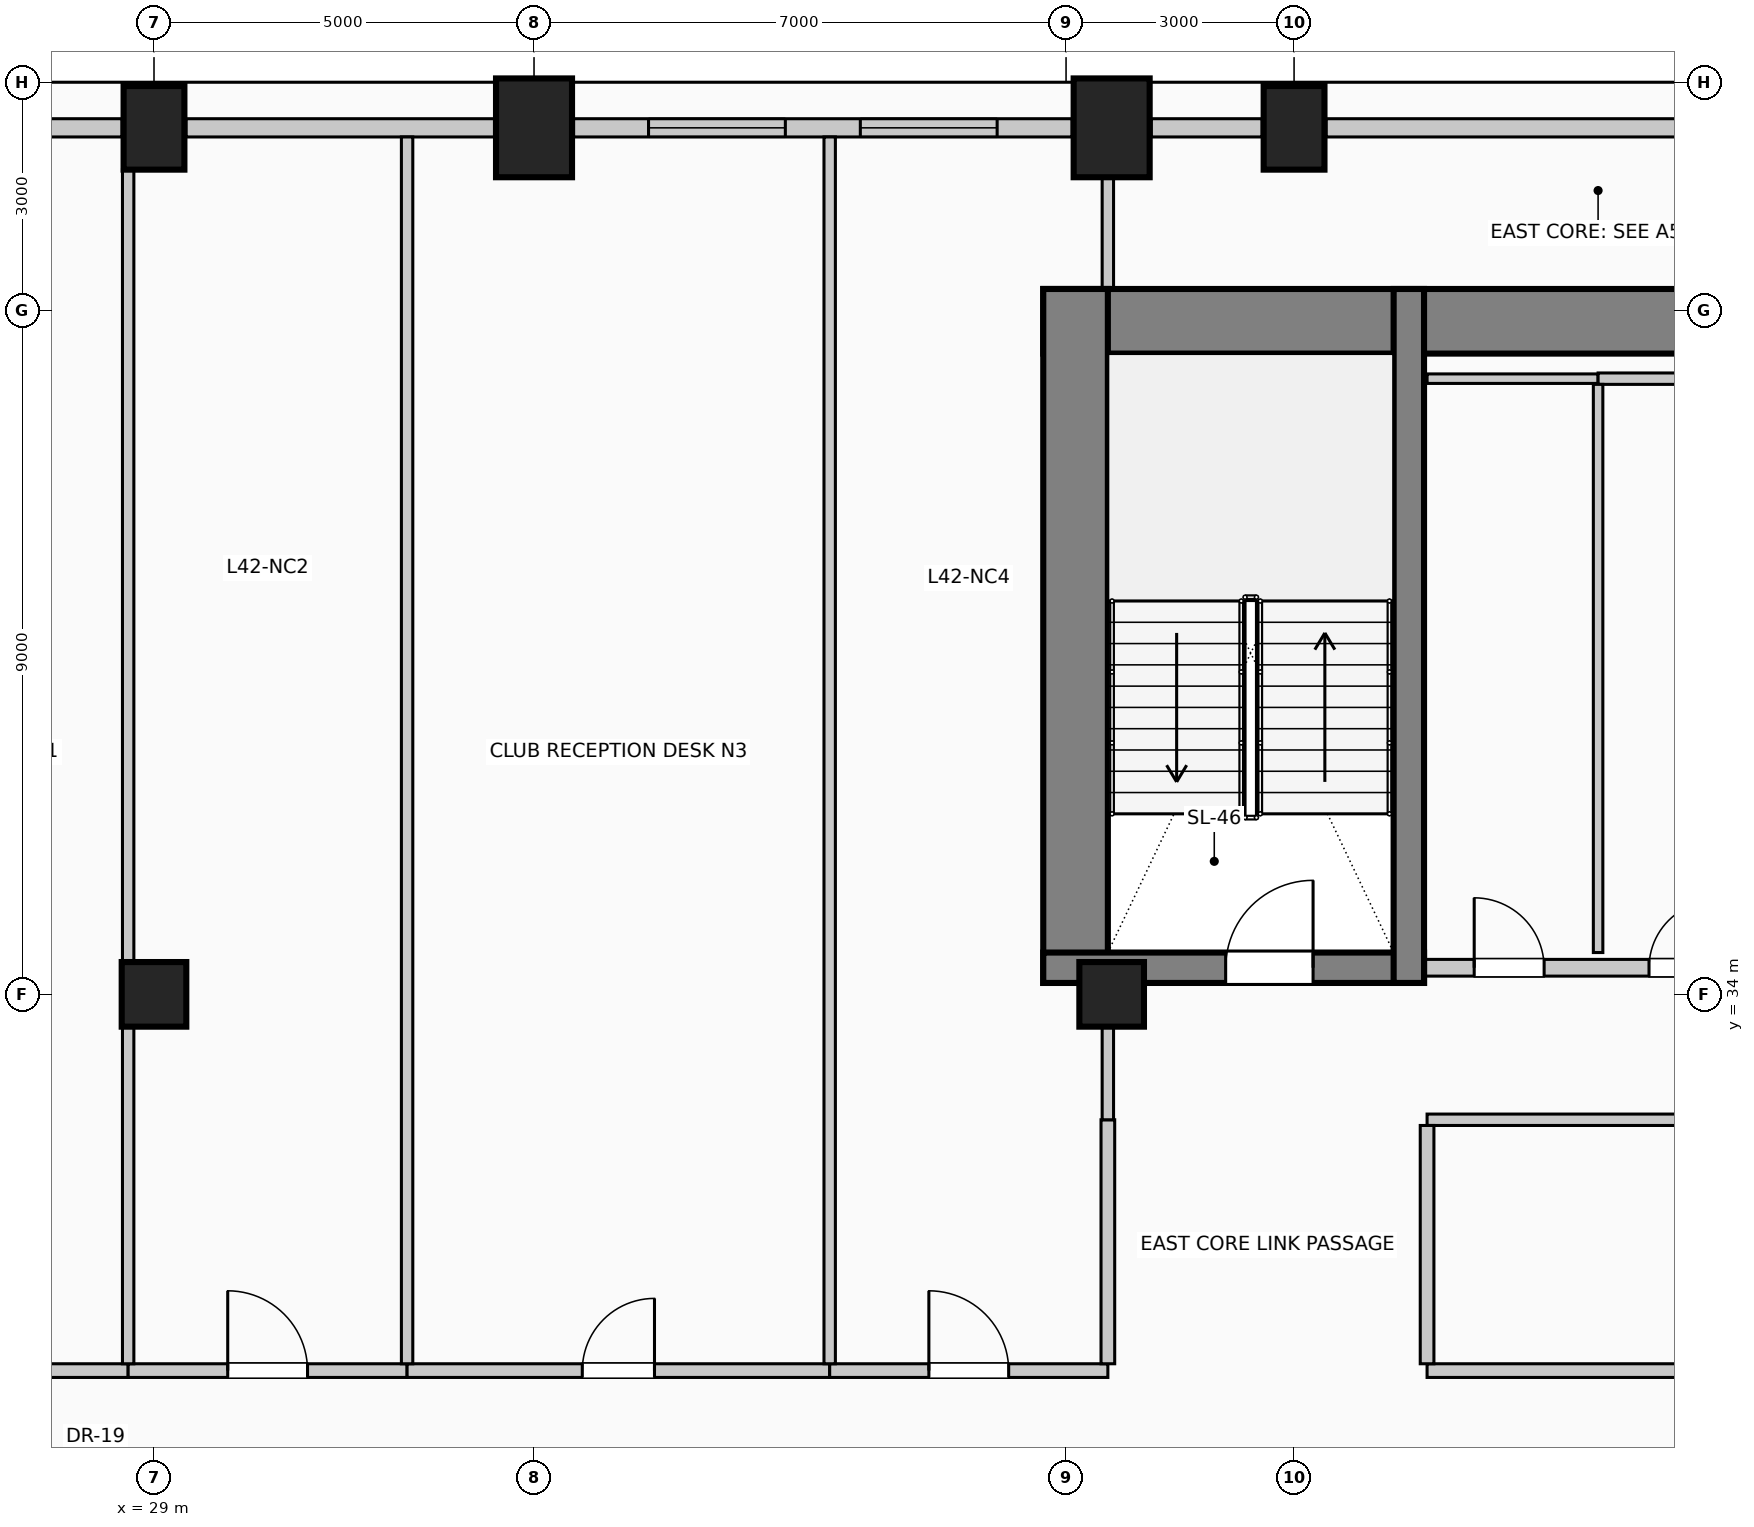
"""IFC4 building model, lengths in metres.
Left out: names, types, materials, properties, quantities, classifications, styles, units other than length and angle.
Written with IfcOpenShell. Run it as: python <this file> out.ifc"""

import sys

from ifc_helpers import new_model, si_unit, direction, frame, frame_2d, origin, origin_2d, place, context, subcontext, project, spatial, rectangle, circle, extrude, element, fill, save


model = new_model("IFC4")
c1 = context("Model", 3, precision=1e-05, world=origin(), true_north=direction((0.0, 1.0)))
c2 = subcontext(c1, "Body", "Model", "MODEL_VIEW")
j1 = project(units=[si_unit("LENGTHUNIT", "METRE"), si_unit("PLANEANGLEUNIT", "RADIAN")], contexts=[c1])
p1 = place(None, origin())
s1 = spatial("IfcSite", under=j1, at=p1, CompositionType="ELEMENT")
p2 = place(p1, origin())
s2 = spatial("IfcBuilding", under=s1, at=p2, CompositionType="ELEMENT")
p3 = place(p2, frame((0.0, 0.0, 174.6)))
s3 = spatial("IfcBuildingStorey", under=s2, at=p3, CompositionType="ELEMENT", Elevation=174.6)
p4 = place(p3, frame((40.7, 42.855, 0.0), z_axis=(0.0, 0.0, 1.0), x_axis=(1.0, 0.0, 0.0)))
e1 = element("IfcWall", 1, at=p4, inside=s3, PredefinedType="SHEAR", context=c2, shape_type="SweptSolid", body=[
    extrude(rectangle(XDim=14.6, YDim=0.85, at=frame_2d((7.3, 0.0))), origin(), (0.0, 0.0, 1.0), 4.0),
])
p5 = place(p3, frame((41.125, 34.15, 0.0), z_axis=(0.0, 0.0, 1.0), x_axis=(0.0, 1.0, 0.0)))
e2 = element("IfcWall", 2, at=p5, inside=s3, PredefinedType="SHEAR", context=c2, shape_type="SweptSolid", body=[
    extrude(rectangle(XDim=9.13, YDim=0.85, at=frame_2d((4.565, 0.0))), origin(), (0.0, 0.0, 1.0), 4.0),
])
p6 = place(p3, frame((40.7, 34.35, 0.0), z_axis=(0.0, 0.0, 1.0), x_axis=(1.0, 0.0, 0.0)))
e3 = element("IfcWall", 3, at=p6, inside=s3, PredefinedType="SHEAR", context=c2, shape_type="SweptSolid", body=[
    extrude(rectangle(XDim=5.01, YDim=0.4, at=frame_2d((2.505, 0.0))), origin(), (0.0, 0.0, 1.0), 4.0),
])
p7 = place(p6, frame((2.4, 0.0, 0.0)))
e4 = element("IfcOpeningElement", 4, at=p7, cuts=e3, PredefinedType="OPENING", context=c2, shape_type="SweptSolid", body=[
    extrude(rectangle(XDim=1.15, YDim=2.2, at=frame_2d((0.575, 1.1))), frame((0.0, 0.21, 0.0), z_axis=(0.0, -1.0, 0.0), x_axis=(1.0, 0.0, 0.0)), (0.0, 0.0, 1.0), 0.42),
])
p8 = place(p3, frame((45.51, 34.15, 0.0), z_axis=(0.0, 0.0, 1.0), x_axis=(0.0, 1.0, 0.0)))
e5 = element("IfcWall", 5, at=p8, inside=s3, PredefinedType="SHEAR", context=c2, shape_type="SweptSolid", body=[
    extrude(rectangle(XDim=9.13, YDim=0.4, at=frame_2d((4.565, 0.0))), origin(), (0.0, 0.0, 1.0), 4.0),
])
p9 = place(p3, frame((29.0, 45.4, 0.0), z_axis=(0.0, 0.0, 1.0), x_axis=(1.0, 0.0, 0.0)))
e6 = element("IfcColumn", 6, at=p9, inside=s3, PredefinedType="COLUMN", context=c2, shape_type="SweptSolid", body=[
    extrude(rectangle(XDim=0.8, YDim=1.1, at=origin_2d()), origin(), (0.0, 0.0, 1.0), 4.0),
])
for number, where, z_axis, x_axis in (
    (7, (34.0, 45.4, 0.0), (0.0, 0.0, 1.0), (1.0, 0.0, 0.0)),
    (8, (41.6, 45.4, 0.0), (0.0, 0.0, 1.0), (1.0, 0.0, 0.0)),
):
    element("IfcColumn", number, at=place(p3, frame(where, z_axis=z_axis, x_axis=x_axis)), inside=s3, PredefinedType="COLUMN", context=c2, shape_type="SweptSolid", body=[
        extrude(rectangle(XDim=1.0, YDim=1.3, at=origin_2d()), origin(), (0.0, 0.0, 1.0), 4.0),
    ])
p10 = place(p3, frame((44.0, 45.4, 0.0), z_axis=(0.0, 0.0, 1.0), x_axis=(1.0, 0.0, 0.0)))
e9 = element("IfcColumn", 9, at=p10, inside=s3, PredefinedType="COLUMN", context=c2, shape_type="SweptSolid", body=[
    extrude(rectangle(XDim=0.8, YDim=1.1, at=origin_2d()), origin(), (0.0, 0.0, 1.0), 4.0),
])
for number, where, z_axis, x_axis in (
    (10, (29.0, 34.0, 0.0), (0.0, 0.0, 1.0), (1.0, 0.0, 0.0)),
    (11, (41.6, 34.0, 0.0), (0.0, 0.0, 1.0), (1.0, 0.0, 0.0)),
):
    element("IfcColumn", number, at=place(p3, frame(where, z_axis=z_axis, x_axis=x_axis)), inside=s3, PredefinedType="COLUMN", context=c2, shape_type="SweptSolid", body=[
        extrude(circle(Radius=0.425, at=origin_2d()), origin(), (0.0, 0.0, 1.0), 4.0),
    ])
p11 = place(p3, frame((24.52, 45.4, 0.0), z_axis=(0.0, 0.0, 1.0), x_axis=(1.0, 0.0, 0.0)))
e12 = element("IfcWall", 12, at=p11, inside=s3, PredefinedType="SOLIDWALL", context=c2, shape_type="SweptSolid", body=[
    extrude(rectangle(XDim=4.06, YDim=0.24, at=frame_2d((2.03, 0.0))), origin(), (0.0, 0.0, 1.0), 2.975),
])
p12 = place(p11, frame((1.13, 0.0, 0.42)))
e13 = element("IfcOpeningElement", 13, at=p12, cuts=e12, PredefinedType="OPENING", context=c2, shape_type="SweptSolid", body=[
    extrude(rectangle(XDim=1.8, YDim=2.2, at=frame_2d((0.9, 1.1))), frame((0.0, 0.13, 0.0), z_axis=(0.0, -1.0, 0.0), x_axis=(1.0, 0.0, 0.0)), (0.0, 0.0, 1.0), 0.26),
])
p13 = place(p3, frame((29.42, 45.4, 0.0), z_axis=(0.0, 0.0, 1.0), x_axis=(1.0, 0.0, 0.0)))
e14 = element("IfcWall", 14, at=p13, inside=s3, PredefinedType="SOLIDWALL", context=c2, shape_type="SweptSolid", body=[
    extrude(rectangle(XDim=4.06, YDim=0.24, at=frame_2d((2.03, 0.0))), origin(), (0.0, 0.0, 1.0), 2.975),
])
p14 = place(p3, frame((34.52, 45.4, 0.0), z_axis=(0.0, 0.0, 1.0), x_axis=(1.0, 0.0, 0.0)))
e15 = element("IfcWall", 15, at=p14, inside=s3, PredefinedType="SOLIDWALL", context=c2, shape_type="SweptSolid", body=[
    extrude(rectangle(XDim=6.56, YDim=0.24, at=frame_2d((3.28, 0.0))), origin(), (0.0, 0.0, 1.0), 2.975),
])
p15 = place(p14, frame((0.987, 0.0, 0.42)))
e16 = element("IfcOpeningElement", 16, at=p15, cuts=e15, PredefinedType="OPENING", context=c2, shape_type="SweptSolid", body=[
    extrude(rectangle(XDim=1.8, YDim=2.2, at=frame_2d((0.9, 1.1))), frame((0.0, 0.13, 0.0), z_axis=(0.0, -1.0, 0.0), x_axis=(1.0, 0.0, 0.0)), (0.0, 0.0, 1.0), 0.26),
])
p16 = place(p14, frame((3.773, 0.0, 0.42)))
e17 = element("IfcOpeningElement", 17, at=p16, cuts=e15, PredefinedType="OPENING", context=c2, shape_type="SweptSolid", body=[
    extrude(rectangle(XDim=1.8, YDim=2.2, at=frame_2d((0.9, 1.1))), frame((0.0, 0.13, 0.0), z_axis=(0.0, -1.0, 0.0), x_axis=(1.0, 0.0, 0.0)), (0.0, 0.0, 1.0), 0.26),
])
p17 = place(p3, frame((42.12, 45.4, 0.0), z_axis=(0.0, 0.0, 1.0), x_axis=(1.0, 0.0, 0.0)))
e18 = element("IfcWall", 18, at=p17, inside=s3, PredefinedType="SOLIDWALL", context=c2, shape_type="SweptSolid", body=[
    extrude(rectangle(XDim=1.46, YDim=0.24, at=frame_2d((0.73, 0.0))), origin(), (0.0, 0.0, 1.0), 2.975),
])
p18 = place(p3, frame((44.42, 45.4, 0.0), z_axis=(0.0, 0.0, 1.0), x_axis=(1.0, 0.0, 0.0)))
e19 = element("IfcWall", 19, at=p18, inside=s3, PredefinedType="SOLIDWALL", context=c2, shape_type="SweptSolid", body=[
    extrude(rectangle(XDim=4.66, YDim=0.24, at=frame_2d((2.33, 0.0))), origin(), (0.0, 0.0, 1.0), 2.975),
])
p19 = place(p3, frame((45.72, 34.35, 0.0), z_axis=(0.0, 0.0, 1.0), x_axis=(1.0, 0.0, 0.0)))
e20 = element("IfcWall", 20, at=p19, inside=s3, PredefinedType="PARTITIONING", context=c2, shape_type="SweptSolid", body=[
    extrude(rectangle(XDim=4.56, YDim=0.22, at=frame_2d((2.28, 0.0))), origin(), (0.0, 0.0, 1.0), 3.725),
])
p20 = place(p19, frame((0.65, 0.0, 0.0)))
e21 = element("IfcOpeningElement", 21, at=p20, cuts=e20, PredefinedType="OPENING", context=c2, shape_type="SweptSolid", body=[
    extrude(rectangle(XDim=0.92, YDim=2.1, at=frame_2d((0.46, 1.05))), frame((0.0, 0.12, 0.0), z_axis=(0.0, -1.0, 0.0), x_axis=(1.0, 0.0, 0.0)), (0.0, 0.0, 1.0), 0.24),
])
p21 = place(p19, frame((2.95, 0.0, 0.0)))
e22 = element("IfcOpeningElement", 22, at=p21, cuts=e20, PredefinedType="OPENING", context=c2, shape_type="SweptSolid", body=[
    extrude(rectangle(XDim=0.88, YDim=2.1, at=frame_2d((0.44, 1.05))), frame((0.0, 0.12, 0.0), z_axis=(0.0, -1.0, 0.0), x_axis=(1.0, 0.0, 0.0)), (0.0, 0.0, 1.0), 0.24),
])
p22 = place(p3, frame((23.1, 29.05, 0.0), z_axis=(0.0, 0.0, 1.0), x_axis=(1.0, 0.0, 0.0)))
e23 = element("IfcWall", 23, at=p22, inside=s3, PredefinedType="PARTITIONING", context=c2, shape_type="SweptSolid", body=[
    extrude(rectangle(XDim=5.56, YDim=0.18, at=frame_2d((2.78, 0.0))), origin(), (0.0, 0.0, 1.0), 3.725),
])
p23 = place(p22, frame((2.305, 0.0, 0.0)))
e24 = element("IfcOpeningElement", 24, at=p23, cuts=e23, PredefinedType="OPENING", context=c2, shape_type="SweptSolid", body=[
    extrude(rectangle(XDim=0.95, YDim=2.15, at=frame_2d((0.475, 1.075))), frame((0.0, 0.1, 0.0), z_axis=(0.0, -1.0, 0.0), x_axis=(1.0, 0.0, 0.0)), (0.0, 0.0, 1.0), 0.2),
])
p24 = place(p3, frame((28.66, 29.05, 0.0), z_axis=(0.0, 0.0, 1.0), x_axis=(1.0, 0.0, 0.0)))
e25 = element("IfcWall", 25, at=p24, inside=s3, PredefinedType="PARTITIONING", context=c2, shape_type="SweptSolid", body=[
    extrude(rectangle(XDim=3.67, YDim=0.18, at=frame_2d((1.835, 0.0))), origin(), (0.0, 0.0, 1.0), 3.725),
])
p25 = place(p24, frame((1.31, 0.0, 0.0)))
e26 = element("IfcOpeningElement", 26, at=p25, cuts=e25, PredefinedType="OPENING", context=c2, shape_type="SweptSolid", body=[
    extrude(rectangle(XDim=1.05, YDim=2.15, at=frame_2d((0.525, 1.075))), frame((0.0, 0.1, 0.0), z_axis=(0.0, -1.0, 0.0), x_axis=(1.0, 0.0, 0.0)), (0.0, 0.0, 1.0), 0.2),
])
p26 = place(p3, frame((32.33, 29.05, 0.0), z_axis=(0.0, 0.0, 1.0), x_axis=(1.0, 0.0, 0.0)))
e27 = element("IfcWall", 27, at=p26, inside=s3, PredefinedType="PARTITIONING", context=c2, shape_type="SweptSolid", body=[
    extrude(rectangle(XDim=5.56, YDim=0.18, at=frame_2d((2.78, 0.0))), origin(), (0.0, 0.0, 1.0), 3.725),
])
p27 = place(p26, frame((2.305, 0.0, 0.0)))
e28 = element("IfcOpeningElement", 28, at=p27, cuts=e27, PredefinedType="OPENING", context=c2, shape_type="SweptSolid", body=[
    extrude(rectangle(XDim=0.95, YDim=2.15, at=frame_2d((0.475, 1.075))), frame((0.0, 0.1, 0.0), z_axis=(0.0, -1.0, 0.0), x_axis=(1.0, 0.0, 0.0)), (0.0, 0.0, 1.0), 0.2),
])
p28 = place(p3, frame((37.89, 29.05, 0.0), z_axis=(0.0, 0.0, 1.0), x_axis=(1.0, 0.0, 0.0)))
e29 = element("IfcWall", 29, at=p28, inside=s3, PredefinedType="PARTITIONING", context=c2, shape_type="SweptSolid", body=[
    extrude(rectangle(XDim=3.66, YDim=0.18, at=frame_2d((1.83, 0.0))), origin(), (0.0, 0.0, 1.0), 3.725),
])
p29 = place(p28, frame((1.305, 0.0, 0.0)))
e30 = element("IfcOpeningElement", 30, at=p29, cuts=e29, PredefinedType="OPENING", context=c2, shape_type="SweptSolid", body=[
    extrude(rectangle(XDim=1.05, YDim=2.15, at=frame_2d((0.525, 1.075))), frame((0.0, 0.1, 0.0), z_axis=(0.0, -1.0, 0.0), x_axis=(1.0, 0.0, 0.0)), (0.0, 0.0, 1.0), 0.2),
])
p30 = place(p3, frame((45.75, 29.05, 0.0), z_axis=(0.0, 0.0, 1.0), x_axis=(1.0, 0.0, 0.0)))
e31 = element("IfcWall", 31, at=p30, inside=s3, PredefinedType="PARTITIONING", context=c2, shape_type="SweptSolid", body=[
    extrude(rectangle(XDim=11.53, YDim=0.18, at=frame_2d((5.765, 0.0))), origin(), (0.0, 0.0, 1.0), 3.725),
])
p31 = place(p30, frame((5.29, 0.0, 0.0)))
e32 = element("IfcOpeningElement", 32, at=p31, cuts=e31, PredefinedType="OPENING", context=c2, shape_type="SweptSolid", body=[
    extrude(rectangle(XDim=0.95, YDim=2.15, at=frame_2d((0.475, 1.075))), frame((0.0, 0.1, 0.0), z_axis=(0.0, -1.0, 0.0), x_axis=(1.0, 0.0, 0.0)), (0.0, 0.0, 1.0), 0.2),
])
p32 = place(p3, frame((45.75, 32.35, 0.0), z_axis=(0.0, 0.0, 1.0), x_axis=(1.0, 0.0, 0.0)))
e33 = element("IfcWall", 33, at=p32, inside=s3, PredefinedType="PARTITIONING", context=c2, shape_type="SweptSolid", body=[
    extrude(rectangle(XDim=8.7, YDim=0.15, at=frame_2d((4.35, 0.0))), origin(), (0.0, 0.0, 1.0), 3.725),
])
p33 = place(p3, frame((45.75, 42.1, 0.0), z_axis=(0.0, 0.0, 1.0), x_axis=(1.0, 0.0, 0.0)))
e34 = element("IfcWall", 34, at=p33, inside=s3, PredefinedType="PARTITIONING", context=c2, shape_type="SweptSolid", body=[
    extrude(rectangle(XDim=2.25, YDim=0.125, at=frame_2d((1.125, 0.0))), origin(), (0.0, 0.0, 1.0), 3.725),
])
p34 = place(p3, frame((48.0, 42.1, 0.0), z_axis=(0.0, 0.0, 1.0), x_axis=(1.0, 0.0, 0.0)))
e35 = element("IfcWall", 35, at=p34, inside=s3, PredefinedType="PARTITIONING", context=c2, shape_type="SweptSolid", body=[
    extrude(rectangle(XDim=2.25, YDim=0.15, at=frame_2d((1.125, 0.0))), origin(), (0.0, 0.0, 1.0), 3.725),
])
p35 = place(p3, frame((28.66, 29.14, 0.0), z_axis=(0.0, 0.0, 1.0), x_axis=(0.0, 1.0, 0.0)))
e36 = element("IfcWall", 36, at=p35, inside=s3, PredefinedType="PARTITIONING", context=c2, shape_type="SweptSolid", body=[
    extrude(rectangle(XDim=4.435, YDim=0.15, at=frame_2d((2.218, 0.0))), origin(), (0.0, 0.0, 1.0), 3.725),
])
p36 = place(p3, frame((28.66, 34.425, 0.0), z_axis=(0.0, 0.0, 1.0), x_axis=(0.0, 1.0, 0.0)))
e37 = element("IfcWall", 37, at=p36, inside=s3, PredefinedType="PARTITIONING", context=c2, shape_type="SweptSolid", body=[
    extrude(rectangle(XDim=10.425, YDim=0.15, at=frame_2d((5.212, 0.0))), origin(), (0.0, 0.0, 1.0), 3.725),
])
for number, where, z_axis, x_axis in (
    (38, (32.33, 29.14, 0.0), (0.0, 0.0, 1.0), (0.0, 1.0, 0.0)),
    (39, (37.89, 29.14, 0.0), (0.0, 0.0, 1.0), (0.0, 1.0, 0.0)),
):
    element("IfcWall", number, at=place(p3, frame(where, z_axis=z_axis, x_axis=x_axis)), inside=s3, PredefinedType="PARTITIONING", context=c2, shape_type="SweptSolid", body=[
        extrude(rectangle(XDim=16.14, YDim=0.15, at=frame_2d((8.07, 0.0))), origin(), (0.0, 0.0, 1.0), 3.725),
    ])
p37 = place(p3, frame((41.55, 29.14, 0.0), z_axis=(0.0, 0.0, 1.0), x_axis=(0.0, 1.0, 0.0)))
e40 = element("IfcWall", 40, at=p37, inside=s3, PredefinedType="PARTITIONING", context=c2, shape_type="SweptSolid", body=[
    extrude(rectangle(XDim=3.21, YDim=0.18, at=frame_2d((1.605, 0.0))), origin(), (0.0, 0.0, 1.0), 3.12),
])
p38 = place(p3, frame((41.55, 32.35, 0.0), z_axis=(0.0, 0.0, 1.0), x_axis=(0.0, 1.0, 0.0)))
e41 = element("IfcWall", 41, at=p38, inside=s3, PredefinedType="PARTITIONING", context=c2, shape_type="SweptSolid", body=[
    extrude(rectangle(XDim=1.225, YDim=0.15, at=frame_2d((0.612, 0.0))), origin(), (0.0, 0.0, 1.0), 3.12),
])
p39 = place(p3, frame((41.55, 43.28, 0.0), z_axis=(0.0, 0.0, 1.0), x_axis=(0.0, 1.0, 0.0)))
e42 = element("IfcWall", 42, at=p39, inside=s3, PredefinedType="PARTITIONING", context=c2, shape_type="SweptSolid", body=[
    extrude(rectangle(XDim=1.47, YDim=0.15, at=frame_2d((0.735, 0.0))), origin(), (0.0, 0.0, 1.0), 3.725),
])
p40 = place(p3, frame((45.75, 29.14, 0.0), z_axis=(0.0, 0.0, 1.0), x_axis=(0.0, 1.0, 0.0)))
e43 = element("IfcWall", 43, at=p40, inside=s3, PredefinedType="PARTITIONING", context=c2, shape_type="SweptSolid", body=[
    extrude(rectangle(XDim=3.135, YDim=0.18, at=frame_2d((1.567, 0.0))), origin(), (0.0, 0.0, 1.0), 3.725),
])
p41 = place(p3, frame((48.0, 34.55, 0.0), z_axis=(0.0, 0.0, 1.0), x_axis=(0.0, 1.0, 0.0)))
e44 = element("IfcWall", 44, at=p41, inside=s3, PredefinedType="PARTITIONING", context=c2, shape_type="SweptSolid", body=[
    extrude(rectangle(XDim=7.475, YDim=0.125, at=frame_2d((3.737, 0.0))), origin(), (0.0, 0.0, 1.0), 3.725),
])
p42 = place(p15, origin())
e45 = element("IfcWindow", 45, at=p42, inside=s3, PartitioningType="SINGLE_PANEL", PredefinedType="WINDOW", context=c2, shape_type="SweptSolid", body=[
    extrude(rectangle(XDim=1.8, YDim=2.2, at=frame_2d((0.9, 1.1))), frame((0.0, 0.03, 0.0), z_axis=(0.0, -1.0, 0.0), x_axis=(1.0, 0.0, 0.0)), (0.0, 0.0, 1.0), 0.06),
])
fill(e16, e45)
p43 = place(p16, origin())
e46 = element("IfcWindow", 46, at=p43, inside=s3, PartitioningType="SINGLE_PANEL", PredefinedType="WINDOW", context=c2, shape_type="SweptSolid", body=[
    extrude(rectangle(XDim=1.8, YDim=2.2, at=frame_2d((0.9, 1.1))), frame((0.0, 0.03, 0.0), z_axis=(0.0, -1.0, 0.0), x_axis=(1.0, 0.0, 0.0)), (0.0, 0.0, 1.0), 0.06),
])
fill(e17, e46)
p44 = place(p7, origin())
e47 = element("IfcDoor", 47, at=p44, inside=s3, OperationType="SINGLE_SWING_RIGHT", PredefinedType="DOOR", context=c2, shape_type="SweptSolid", body=[
    extrude(rectangle(XDim=1.15, YDim=2.2, at=frame_2d((0.575, 1.1))), frame((0.0, 0.025, 0.0), z_axis=(0.0, -1.0, 0.0), x_axis=(1.0, 0.0, 0.0)), (0.0, 0.0, 1.0), 0.05),
])
fill(e4, e47)
p45 = place(p20, origin())
e48 = element("IfcDoor", 48, at=p45, inside=s3, OperationType="SINGLE_SWING_LEFT", PredefinedType="DOOR", context=c2, shape_type="SweptSolid", body=[
    extrude(rectangle(XDim=0.92, YDim=2.1, at=frame_2d((0.46, 1.05))), frame((0.0, 0.025, 0.0), z_axis=(0.0, -1.0, 0.0), x_axis=(1.0, 0.0, 0.0)), (0.0, 0.0, 1.0), 0.05),
])
fill(e21, e48)
p46 = place(p21, origin())
e49 = element("IfcDoor", 49, at=p46, inside=s3, OperationType="SINGLE_SWING_RIGHT", PredefinedType="DOOR", context=c2, shape_type="SweptSolid", body=[
    extrude(rectangle(XDim=0.88, YDim=2.1, at=frame_2d((0.44, 1.05))), frame((0.0, 0.025, 0.0), z_axis=(0.0, -1.0, 0.0), x_axis=(1.0, 0.0, 0.0)), (0.0, 0.0, 1.0), 0.05),
])
fill(e22, e49)
p47 = place(p25, origin())
e50 = element("IfcDoor", 50, at=p47, inside=s3, OperationType="SINGLE_SWING_LEFT", PredefinedType="DOOR", context=c2, shape_type="SweptSolid", body=[
    extrude(rectangle(XDim=1.05, YDim=2.15, at=frame_2d((0.525, 1.075))), frame((0.0, 0.025, 0.0), z_axis=(0.0, -1.0, 0.0), x_axis=(1.0, 0.0, 0.0)), (0.0, 0.0, 1.0), 0.05),
])
fill(e26, e50)
p48 = place(p27, origin())
e51 = element("IfcDoor", 51, at=p48, inside=s3, OperationType="SINGLE_SWING_RIGHT", PredefinedType="DOOR", context=c2, shape_type="SweptSolid", body=[
    extrude(rectangle(XDim=0.95, YDim=2.15, at=frame_2d((0.475, 1.075))), frame((0.0, 0.025, 0.0), z_axis=(0.0, -1.0, 0.0), x_axis=(1.0, 0.0, 0.0)), (0.0, 0.0, 1.0), 0.05),
])
fill(e28, e51)
p49 = place(p29, origin())
e52 = element("IfcDoor", 52, at=p49, inside=s3, OperationType="SINGLE_SWING_LEFT", PredefinedType="DOOR", context=c2, shape_type="SweptSolid", body=[
    extrude(rectangle(XDim=1.05, YDim=2.15, at=frame_2d((0.525, 1.075))), frame((0.0, 0.025, 0.0), z_axis=(0.0, -1.0, 0.0), x_axis=(1.0, 0.0, 0.0)), (0.0, 0.0, 1.0), 0.05),
])
fill(e30, e52)
save(model, sys.argv[1])
